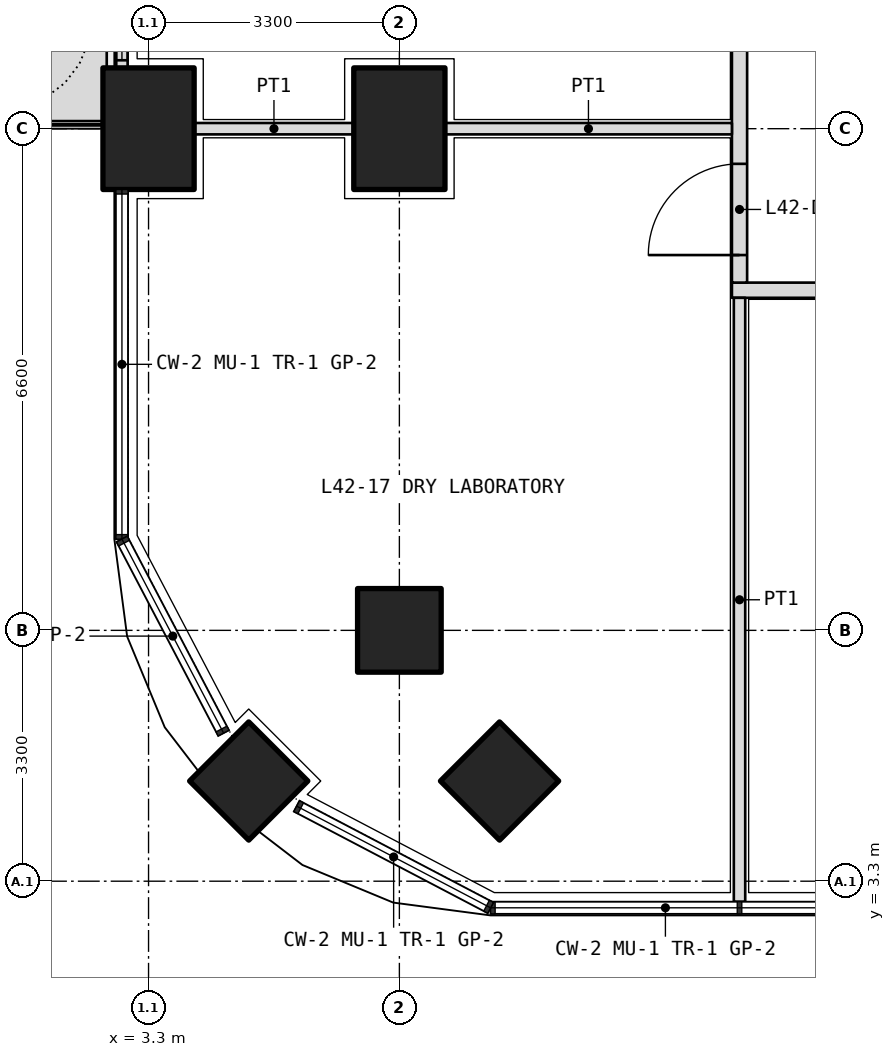
"""IFC4 building model, lengths in metres.
Left out: names, types, materials, properties, quantities, classifications, styles, units other than length and angle.
Written with IfcOpenShell. Run it as: python <this file> out.ifc"""

import sys

from ifc_helpers import new_model, si_unit, direction, frame, frame_2d, origin, origin_2d, place, context, subcontext, project, spatial, polyline, rectangle, outline, extrude, element, fill, save


model = new_model("IFC4")
c1 = context("Model", 3, precision=1e-05, world=origin(), true_north=direction((0.0, 1.0)))
c2 = subcontext(c1, "Body", "Model", "MODEL_VIEW")
j1 = project(units=[si_unit("LENGTHUNIT", "METRE"), si_unit("PLANEANGLEUNIT", "RADIAN")], contexts=[c1])
p1 = place(None, origin())
s1 = spatial("IfcSite", under=j1, at=p1, CompositionType="ELEMENT")
p2 = place(p1, origin())
s2 = spatial("IfcBuilding", under=s1, at=p2, CompositionType="ELEMENT")
p3 = place(p2, frame((0.0, 0.0, 185.1)))
s3 = spatial("IfcBuildingStorey", under=s2, at=p3, CompositionType="ELEMENT", Elevation=185.1)
p4 = place(p3, frame((4.618, 4.618, 0.0), z_axis=(0.0, 0.0, 1.0), x_axis=(0.707106781187, 0.707106781187, 0.0)))
e1 = element("IfcColumn", 1, at=p4, inside=s3, PredefinedType="COLUMN", context=c2, shape_type="SweptSolid", body=[
    extrude(rectangle(XDim=1.1, YDim=1.1, at=origin_2d()), origin(), (0.0, 0.0, 1.0), 4.2),
])
p5 = place(p3, frame((3.3, 13.2, 0.0), z_axis=(0.0, 0.0, 1.0), x_axis=(0.0, 1.0, 0.0)))
e2 = element("IfcColumn", 2, at=p5, inside=s3, PredefinedType="COLUMN", context=c2, shape_type="SweptSolid", body=[
    extrude(rectangle(XDim=1.6, YDim=1.2, at=origin_2d()), origin(), (0.0, 0.0, 1.0), 4.2),
])
for number, where, z_axis, x_axis in (
    (3, (6.6, 6.6, 0.0), (0.0, 0.0, 1.0), (1.0, 0.0, 0.0)),
    (4, (7.918, 4.618, 0.0), (0.0, 0.0, 1.0), (0.707, 0.707, 0.0)),
):
    element("IfcColumn", number, at=place(p3, frame(where, z_axis=z_axis, x_axis=x_axis)), inside=s3, PredefinedType="COLUMN", context=c2, shape_type="SweptSolid", body=[
        extrude(rectangle(XDim=1.1, YDim=1.1, at=origin_2d()), origin(), (0.0, 0.0, 1.0), 4.2),
    ])
p6 = place(p3, frame((6.6, 13.2, 0.0), z_axis=(0.0, 0.0, 1.0), x_axis=(0.0, 1.0, 0.0)))
e5 = element("IfcColumn", 5, at=p6, inside=s3, PredefinedType="COLUMN", context=c2, shape_type="SweptSolid", body=[
    extrude(rectangle(XDim=1.6, YDim=1.2, at=origin_2d()), origin(), (0.0, 0.0, 1.0), 4.2),
])
p7 = place(p3, origin())
e6 = element("IfcWall", 6, at=p7, inside=s3, PredefinedType="USERDEFINED", context=c2, shape_type="SweptSolid", body=[
    extrude(outline(polyline([(1.75, 13.3), (2.75, 13.3), (2.75, 15.75), (1.75, 15.75), (1.75, 13.3)]), holes=[polyline([(1.9, 13.45), (2.6, 13.45), (2.6, 15.6), (1.9, 15.6), (1.9, 13.45)])]), origin(), (0.0, 0.0, 1.0), 1.05),
])
p8 = place(p3, frame((2.95, 19.0, 0.0), z_axis=(0.0, 0.0, 1.0), x_axis=(0.0, -1.0, 0.0)))
e7 = element("IfcWall", 7, at=p8, inside=s3, PredefinedType="SOLIDWALL", context=c2, shape_type="SweptSolid", body=[
    extrude(rectangle(XDim=5.0, YDim=0.15, at=frame_2d((2.5, 0.0))), origin(), (0.0, 0.0, 1.0), 2.7),
])
p9 = place(p8, frame((1.25, 0.0, 0.0)))
e8 = element("IfcOpeningElement", 8, at=p9, cuts=e7, PredefinedType="OPENING", context=c2, shape_type="SweptSolid", body=[
    extrude(rectangle(XDim=1.0, YDim=2.4, at=frame_2d((0.5, 1.2))), frame((0.0, 0.085, 0.0), z_axis=(0.0, -1.0, 0.0), x_axis=(1.0, 0.0, 0.0)), (0.0, 0.0, 1.0), 0.17),
])
p10 = place(p8, frame((0.1, 0.0, 0.1)))
e9 = element("IfcOpeningElement", 9, at=p10, cuts=e7, PredefinedType="OPENING", context=c2, shape_type="SweptSolid", body=[
    extrude(rectangle(XDim=1.05, YDim=2.3, at=frame_2d((0.525, 1.15))), frame((0.0, 0.085, 0.0), z_axis=(0.0, -1.0, 0.0), x_axis=(1.0, 0.0, 0.0)), (0.0, 0.0, 1.0), 0.17),
])
p11 = place(p8, frame((2.75, 0.0, 0.1)))
e10 = element("IfcOpeningElement", 10, at=p11, cuts=e7, PredefinedType="OPENING", context=c2, shape_type="SweptSolid", body=[
    extrude(rectangle(XDim=2.15, YDim=2.3, at=frame_2d((1.075, 1.15))), frame((0.0, 0.085, 0.0), z_axis=(0.0, -1.0, 0.0), x_axis=(1.0, 0.0, 0.0)), (0.0, 0.0, 1.0), 0.17),
])
p12 = place(p3, frame((10.975, 11.075, 0.0), z_axis=(0.0, 0.0, 1.0), x_axis=(1.0, 0.0, 0.0)))
e11 = element("IfcWall", 11, at=p12, inside=s3, PredefinedType="PARTITIONING", context=c2, shape_type="SweptSolid", body=[
    extrude(rectangle(XDim=30.85, YDim=0.2, at=frame_2d((15.425, 0.0))), origin(), (0.0, 0.0, 1.0), 2.85),
])
p13 = place(p12, frame((3.863, 0.0, 0.0)))
e12 = element("IfcOpeningElement", 12, at=p13, cuts=e11, PredefinedType="OPENING", context=c2, shape_type="SweptSolid", body=[
    extrude(rectangle(XDim=1.2, YDim=2.1, at=frame_2d((0.6, 1.05))), frame((0.0, 0.11, 0.0), z_axis=(0.0, -1.0, 0.0), x_axis=(1.0, 0.0, 0.0)), (0.0, 0.0, 1.0), 0.22),
])
p14 = place(p12, frame((11.525, 0.0, 0.0)))
e13 = element("IfcOpeningElement", 13, at=p14, cuts=e11, PredefinedType="OPENING", context=c2, shape_type="SweptSolid", body=[
    extrude(rectangle(XDim=1.2, YDim=2.1, at=frame_2d((0.6, 1.05))), frame((0.0, 0.11, 0.0), z_axis=(0.0, -1.0, 0.0), x_axis=(1.0, 0.0, 0.0)), (0.0, 0.0, 1.0), 0.22),
])
p15 = place(p12, frame((18.125, 0.0, 0.0)))
e14 = element("IfcOpeningElement", 14, at=p15, cuts=e11, PredefinedType="OPENING", context=c2, shape_type="SweptSolid", body=[
    extrude(rectangle(XDim=1.2, YDim=2.1, at=frame_2d((0.6, 1.05))), frame((0.0, 0.11, 0.0), z_axis=(0.0, -1.0, 0.0), x_axis=(1.0, 0.0, 0.0)), (0.0, 0.0, 1.0), 0.22),
])
p16 = place(p12, frame((23.075, 0.0, 0.0)))
e15 = element("IfcOpeningElement", 15, at=p16, cuts=e11, PredefinedType="OPENING", context=c2, shape_type="SweptSolid", body=[
    extrude(rectangle(XDim=1.2, YDim=2.1, at=frame_2d((0.6, 1.05))), frame((0.0, 0.11, 0.0), z_axis=(0.0, -1.0, 0.0), x_axis=(1.0, 0.0, 0.0)), (0.0, 0.0, 1.0), 0.22),
])
p17 = place(p12, frame((27.438, 0.0, 0.0)))
e16 = element("IfcOpeningElement", 16, at=p17, cuts=e11, PredefinedType="OPENING", context=c2, shape_type="SweptSolid", body=[
    extrude(rectangle(XDim=1.2, YDim=2.1, at=frame_2d((0.6, 1.05))), frame((0.0, 0.11, 0.0), z_axis=(0.0, -1.0, 0.0), x_axis=(1.0, 0.0, 0.0)), (0.0, 0.0, 1.0), 0.22),
])
p18 = place(p3, frame((11.075, 11.175, 0.0), z_axis=(0.0, 0.0, 1.0), x_axis=(0.0, 1.0, 0.0)))
e17 = element("IfcWall", 17, at=p18, inside=s3, PredefinedType="PARTITIONING", context=c2, shape_type="SweptSolid", body=[
    extrude(rectangle(XDim=15.225, YDim=0.2, at=frame_2d((7.612, 0.0))), origin(), (0.0, 0.0, 1.0), 2.85),
])
p19 = place(p18, frame((0.363, 0.0, 0.0)))
e18 = element("IfcOpeningElement", 18, at=p19, cuts=e17, PredefinedType="OPENING", context=c2, shape_type="SweptSolid", body=[
    extrude(rectangle(XDim=1.2, YDim=2.1, at=frame_2d((0.6, 1.05))), frame((0.0, 0.11, 0.0), z_axis=(0.0, -1.0, 0.0), x_axis=(1.0, 0.0, 0.0)), (0.0, 0.0, 1.0), 0.22),
])
p20 = place(p18, frame((3.125, 0.0, 0.0)))
e19 = element("IfcOpeningElement", 19, at=p20, cuts=e17, PredefinedType="OPENING", context=c2, shape_type="SweptSolid", body=[
    extrude(rectangle(XDim=1.0, YDim=2.1, at=frame_2d((0.5, 1.05))), frame((0.0, 0.11, 0.0), z_axis=(0.0, -1.0, 0.0), x_axis=(1.0, 0.0, 0.0)), (0.0, 0.0, 1.0), 0.22),
])
p21 = place(p18, frame((6.475, 0.0, 0.0)))
e20 = element("IfcOpeningElement", 20, at=p21, cuts=e17, PredefinedType="OPENING", context=c2, shape_type="SweptSolid", body=[
    extrude(rectangle(XDim=0.9, YDim=2.1, at=frame_2d((0.45, 1.05))), frame((0.0, 0.11, 0.0), z_axis=(0.0, -1.0, 0.0), x_axis=(1.0, 0.0, 0.0)), (0.0, 0.0, 1.0), 0.22),
])
p22 = place(p18, frame((9.675, 0.0, 0.0)))
e21 = element("IfcOpeningElement", 21, at=p22, cuts=e17, PredefinedType="OPENING", context=c2, shape_type="SweptSolid", body=[
    extrude(rectangle(XDim=0.9, YDim=2.1, at=frame_2d((0.45, 1.05))), frame((0.0, 0.11, 0.0), z_axis=(0.0, -1.0, 0.0), x_axis=(1.0, 0.0, 0.0)), (0.0, 0.0, 1.0), 0.22),
])
p23 = place(p18, frame((12.925, 0.0, 0.0)))
e22 = element("IfcOpeningElement", 22, at=p23, cuts=e17, PredefinedType="OPENING", context=c2, shape_type="SweptSolid", body=[
    extrude(rectangle(XDim=1.0, YDim=2.1, at=frame_2d((0.5, 1.05))), frame((0.0, 0.11, 0.0), z_axis=(0.0, -1.0, 0.0), x_axis=(1.0, 0.0, 0.0)), (0.0, 0.0, 1.0), 0.22),
])
p24 = place(p3, frame((11.075, 3.03, 0.0), z_axis=(0.0, 0.0, 1.0), x_axis=(0.0, 1.0, 0.0)))
e23 = element("IfcWall", 23, at=p24, inside=s3, PredefinedType="PARTITIONING", context=c2, shape_type="SweptSolid", body=[
    extrude(rectangle(XDim=7.945, YDim=0.15, at=frame_2d((3.973, 0.0))), origin(), (0.0, 0.0, 1.0), 2.7),
])
p25 = place(p3, frame((3.9, 13.2, 0.0), z_axis=(0.0, 0.0, 1.0), x_axis=(1.0, 0.0, 0.0)))
e24 = element("IfcWall", 24, at=p25, inside=s3, PredefinedType="PARTITIONING", context=c2, shape_type="SweptSolid", body=[
    extrude(rectangle(XDim=2.1, YDim=0.15, at=frame_2d((1.05, 0.0))), origin(), (0.0, 0.0, 1.0), 2.85),
])
p26 = place(p3, frame((7.2, 13.2, 0.0), z_axis=(0.0, 0.0, 1.0), x_axis=(1.0, 0.0, 0.0)))
e25 = element("IfcWall", 25, at=p26, inside=s3, PredefinedType="PARTITIONING", context=c2, shape_type="SweptSolid", body=[
    extrude(rectangle(XDim=3.775, YDim=0.15, at=frame_2d((1.888, 0.0))), origin(), (0.0, 0.0, 1.0), 2.85),
])
p27 = place(p11, origin())
e26 = element("IfcWindow", 26, at=p27, inside=s3, PartitioningType="SINGLE_PANEL", PredefinedType="WINDOW", context=c2, shape_type="SweptSolid", body=[
    extrude(rectangle(XDim=2.15, YDim=2.3, at=frame_2d((1.075, 1.15))), frame((0.0, 0.03, 0.0), z_axis=(0.0, -1.0, 0.0), x_axis=(1.0, 0.0, 0.0)), (0.0, 0.0, 1.0), 0.06),
])
fill(e10, e26)
p28 = place(p19, origin())
e27 = element("IfcDoor", 27, at=p28, inside=s3, OperationType="DOUBLE_DOOR_SINGLE_SWING", PredefinedType="DOOR", context=c2, shape_type="SweptSolid", body=[
    extrude(rectangle(XDim=1.2, YDim=2.1, at=frame_2d((0.6, 1.05))), frame((0.0, 0.025, 0.0), z_axis=(0.0, -1.0, 0.0), x_axis=(1.0, 0.0, 0.0)), (0.0, 0.0, 1.0), 0.05),
])
fill(e18, e27)
save(model, sys.argv[1])
